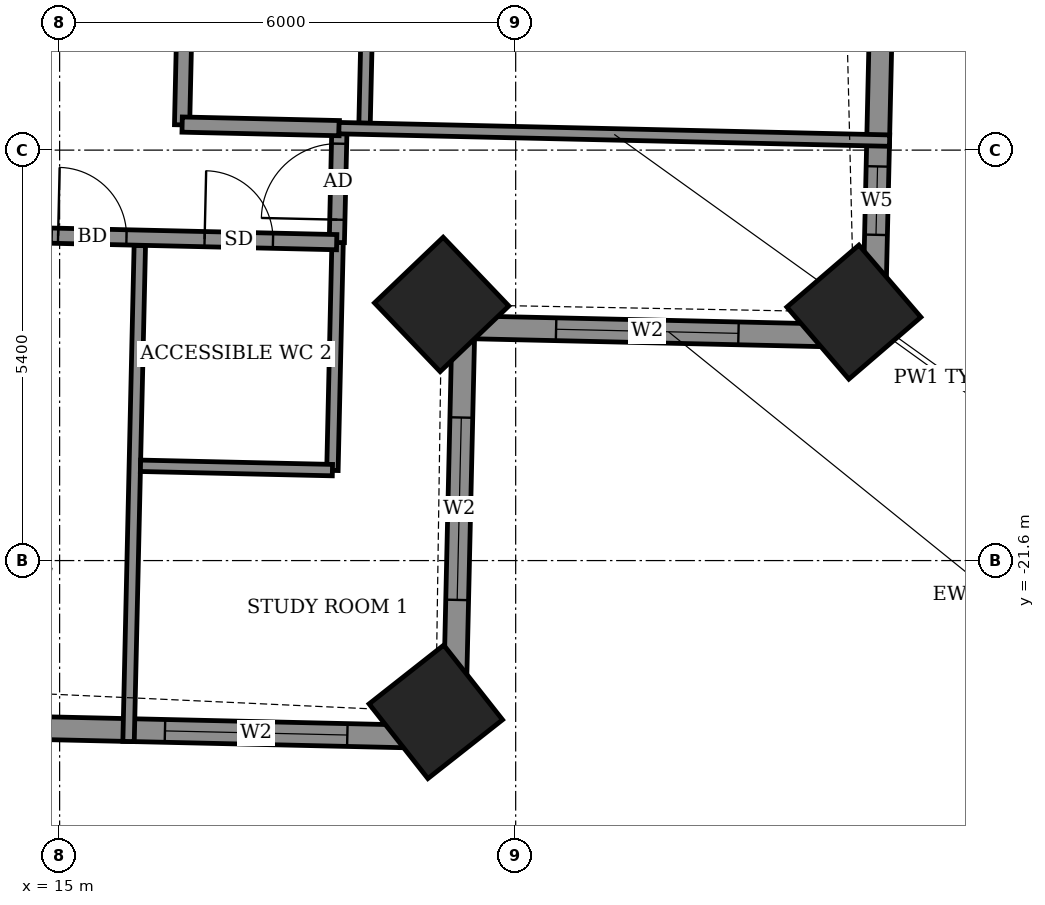
"""IFC4 building model, lengths in metres.
Left out: names, types, materials, properties, quantities, classifications, styles, units other than length and angle.
Written with IfcOpenShell. Run it as: python <this file> out.ifc"""

import sys

from ifc_helpers import new_model, si_unit, direction, frame, frame_2d, origin, origin_2d, place, context, subcontext, project, spatial, rectangle, extrude, element, fill, save


model = new_model("IFC4")
c1 = context("Model", 3, precision=1e-05, world=origin(), true_north=direction((0.0, 1.0)))
c2 = subcontext(c1, "Body", "Model", "MODEL_VIEW")
j1 = project(units=[si_unit("LENGTHUNIT", "METRE"), si_unit("PLANEANGLEUNIT", "RADIAN")], contexts=[c1])
p1 = place(None, origin())
s1 = spatial("IfcSite", under=j1, at=p1, CompositionType="ELEMENT")
p2 = place(p1, origin())
s2 = spatial("IfcBuilding", under=s1, at=p2, CompositionType="ELEMENT")
p3 = place(p2, frame((0.0, 0.0, 152.7)))
s3 = spatial("IfcBuildingStorey", under=s2, at=p3, CompositionType="ELEMENT", Elevation=152.7)
for number, where, z_axis, x_axis in (
    (1, (19.949, -23.59, -0.55), (0.0, 0.0, 1.0), (0.786, 0.619, 0.0)),
    (2, (20.026, -18.23, -0.55), (0.0, 0.0, 1.0), (0.723, 0.691, 0.0)),
    (3, (25.449, -18.331, -0.55), (0.0, 0.0, 1.0), (0.758, 0.652, 0.0)),
):
    element("IfcColumn", number, at=place(p3, frame(where, z_axis=z_axis, x_axis=x_axis)), inside=s3, PredefinedType="COLUMN", context=c2, shape_type="SweptSolid", body=[
        extrude(rectangle(XDim=1.25, YDim=1.25, at=origin_2d()), origin(), (0.0, 0.0, 1.0), 3.6),
    ])
p4 = place(p3, frame((25.71, -18.651, 0.0), z_axis=(0.0, 0.0, 1.0), x_axis=(0.02274444447, 0.999741311663, 0.0)))
e4 = element("IfcWall", 4, at=p4, inside=s3, PredefinedType="SOLIDWALL", context=c2, shape_type="SweptSolid", body=[
    extrude(rectangle(XDim=9.628, YDim=0.3, at=frame_2d((4.814, 0.0))), origin(), (0.0, 0.0, 1.0), 2.55),
])
p5 = place(p4, frame((1.337, 0.0, 0.9)))
e5 = element("IfcOpeningElement", 5, at=p5, cuts=e4, PredefinedType="OPENING", context=c2, shape_type="SweptSolid", body=[
    extrude(rectangle(XDim=0.9, YDim=1.5, at=frame_2d((0.45, 0.75))), frame((0.0, 0.16, 0.0), z_axis=(0.0, -1.0, 0.0), x_axis=(1.0, 0.0, 0.0)), (0.0, 0.0, 1.0), 0.32),
])
p6 = place(p4, frame((5.506, 0.0, 0.0)))
e6 = element("IfcOpeningElement", 6, at=p6, cuts=e4, PredefinedType="OPENING", context=c2, shape_type="SweptSolid", body=[
    extrude(rectangle(XDim=1.2, YDim=2.4, at=frame_2d((0.6, 1.2))), frame((0.0, 0.16, 0.0), z_axis=(0.0, -1.0, 0.0), x_axis=(1.0, 0.0, 0.0)), (0.0, 0.0, 1.0), 0.32),
])
p7 = place(p4, frame((7.537, 0.0, 0.9)))
e7 = element("IfcOpeningElement", 7, at=p7, cuts=e4, PredefinedType="OPENING", context=c2, shape_type="SweptSolid", body=[
    extrude(rectangle(XDim=1.2, YDim=1.5, at=frame_2d((0.6, 0.75))), frame((0.0, 0.16, 0.0), z_axis=(0.0, -1.0, 0.0), x_axis=(1.0, 0.0, 0.0)), (0.0, 0.0, 1.0), 0.32),
])
p8 = place(p3, frame((-18.781, -23.043, 0.0), z_axis=(0.0, 0.0, 1.0), x_axis=(0.999742794992, -0.022679150367, 0.0)))
e8 = element("IfcWall", 8, at=p8, inside=s3, PredefinedType="SOLIDWALL", context=c2, shape_type="SweptSolid", body=[
    extrude(rectangle(XDim=38.98, YDim=0.3, at=frame_2d((19.49, 0.0))), origin(), (0.0, 0.0, 1.0), 3.05),
])
p9 = place(p8, frame((1.94, 0.0, 0.0)))
e9 = element("IfcOpeningElement", 9, at=p9, cuts=e8, PredefinedType="OPENING", context=c2, shape_type="SweptSolid", body=[
    extrude(rectangle(XDim=1.5, YDim=2.4, at=frame_2d((0.75, 1.2))), frame((0.0, 0.16, 0.0), z_axis=(0.0, -1.0, 0.0), x_axis=(1.0, 0.0, 0.0)), (0.0, 0.0, 1.0), 0.32),
])
p10 = place(p8, frame((7.211, 0.0, 0.0)))
e10 = element("IfcOpeningElement", 10, at=p10, cuts=e8, PredefinedType="OPENING", context=c2, shape_type="SweptSolid", body=[
    extrude(rectangle(XDim=1.2, YDim=2.4, at=frame_2d((0.6, 1.2))), frame((0.0, 0.16, 0.0), z_axis=(0.0, -1.0, 0.0), x_axis=(1.0, 0.0, 0.0)), (0.0, 0.0, 1.0), 0.32),
])
p11 = place(p8, frame((9.959, 0.0, 0.0)))
e11 = element("IfcOpeningElement", 11, at=p11, cuts=e8, PredefinedType="OPENING", context=c2, shape_type="SweptSolid", body=[
    extrude(rectangle(XDim=1.5, YDim=2.4, at=frame_2d((0.75, 1.2))), frame((0.0, 0.16, 0.0), z_axis=(0.0, -1.0, 0.0), x_axis=(1.0, 0.0, 0.0)), (0.0, 0.0, 1.0), 0.32),
])
p12 = place(p8, frame((14.659, 0.0, 0.0)))
e12 = element("IfcOpeningElement", 12, at=p12, cuts=e8, PredefinedType="OPENING", context=c2, shape_type="SweptSolid", body=[
    extrude(rectangle(XDim=1.5, YDim=2.4, at=frame_2d((0.75, 1.2))), frame((0.0, 0.16, 0.0), z_axis=(0.0, -1.0, 0.0), x_axis=(1.0, 0.0, 0.0)), (0.0, 0.0, 1.0), 0.32),
])
p13 = place(p8, frame((20.232, 0.0, 0.0)))
e13 = element("IfcOpeningElement", 13, at=p13, cuts=e8, PredefinedType="OPENING", context=c2, shape_type="SweptSolid", body=[
    extrude(rectangle(XDim=1.2, YDim=2.4, at=frame_2d((0.6, 1.2))), frame((0.0, 0.16, 0.0), z_axis=(0.0, -1.0, 0.0), x_axis=(1.0, 0.0, 0.0)), (0.0, 0.0, 1.0), 0.32),
])
p14 = place(p8, frame((22.981, 0.0, 0.0)))
e14 = element("IfcOpeningElement", 14, at=p14, cuts=e8, PredefinedType="OPENING", context=c2, shape_type="SweptSolid", body=[
    extrude(rectangle(XDim=1.5, YDim=2.4, at=frame_2d((0.75, 1.2))), frame((0.0, 0.16, 0.0), z_axis=(0.0, -1.0, 0.0), x_axis=(1.0, 0.0, 0.0)), (0.0, 0.0, 1.0), 0.32),
])
p15 = place(p8, frame((27.681, 0.0, 0.0)))
e15 = element("IfcOpeningElement", 15, at=p15, cuts=e8, PredefinedType="OPENING", context=c2, shape_type="SweptSolid", body=[
    extrude(rectangle(XDim=1.5, YDim=2.4, at=frame_2d((0.75, 1.2))), frame((0.0, 0.16, 0.0), z_axis=(0.0, -1.0, 0.0), x_axis=(1.0, 0.0, 0.0)), (0.0, 0.0, 1.0), 0.32),
])
p16 = place(p8, frame((30.654, 0.0, 0.0)))
e16 = element("IfcOpeningElement", 16, at=p16, cuts=e8, PredefinedType="OPENING", context=c2, shape_type="SweptSolid", body=[
    extrude(rectangle(XDim=1.2, YDim=2.4, at=frame_2d((0.6, 1.2))), frame((0.0, 0.16, 0.0), z_axis=(0.0, -1.0, 0.0), x_axis=(1.0, 0.0, 0.0)), (0.0, 0.0, 1.0), 0.32),
])
p17 = place(p8, frame((35.176, 0.0, 0.9)))
e17 = element("IfcOpeningElement", 17, at=p17, cuts=e8, PredefinedType="OPENING", context=c2, shape_type="SweptSolid", body=[
    extrude(rectangle(XDim=2.4, YDim=1.5, at=frame_2d((1.2, 0.75))), frame((0.0, 0.16, 0.0), z_axis=(0.0, -1.0, 0.0), x_axis=(1.0, 0.0, 0.0)), (0.0, 0.0, 1.0), 0.32),
])
p18 = place(p3, frame((20.189, -23.927, 0.0), z_axis=(0.0, 0.0, 1.0), x_axis=(0.022789195272, 0.999740292565, 0.0)))
e18 = element("IfcWall", 18, at=p18, inside=s3, PredefinedType="SOLIDWALL", context=c2, shape_type="SweptSolid", body=[
    extrude(rectangle(XDim=5.399, YDim=0.3, at=frame_2d((2.7, 0.0))), origin(), (0.0, 0.0, 1.0), 2.55),
])
p19 = place(p18, frame((1.81, 0.0, 0.9)))
e19 = element("IfcOpeningElement", 19, at=p19, cuts=e18, PredefinedType="OPENING", context=c2, shape_type="SweptSolid", body=[
    extrude(rectangle(XDim=2.4, YDim=1.5, at=frame_2d((1.2, 0.75))), frame((0.0, 0.16, 0.0), z_axis=(0.0, -1.0, 0.0), x_axis=(1.0, 0.0, 0.0)), (0.0, 0.0, 1.0), 0.32),
])
p20 = place(p3, frame((20.312, -18.529, 0.0), z_axis=(0.0, 0.0, 1.0), x_axis=(0.999745417973, -0.02256322766, 0.0)))
e20 = element("IfcWall", 20, at=p20, inside=s3, PredefinedType="SOLIDWALL", context=c2, shape_type="SweptSolid", body=[
    extrude(rectangle(XDim=5.399, YDim=0.3, at=frame_2d((2.7, 0.0))), origin(), (0.0, 0.0, 1.0), 2.55),
])
p21 = place(p20, frame((1.22, 0.0, 0.9)))
e21 = element("IfcOpeningElement", 21, at=p21, cuts=e20, PredefinedType="OPENING", context=c2, shape_type="SweptSolid", body=[
    extrude(rectangle(XDim=2.4, YDim=1.5, at=frame_2d((1.2, 0.75))), frame((0.0, 0.16, 0.0), z_axis=(0.0, -1.0, 0.0), x_axis=(1.0, 0.0, 0.0)), (0.0, 0.0, 1.0), 0.32),
])
p22 = place(p3, frame((15.907, -23.98, 0.0), z_axis=(0.0, 0.0, 1.0), x_axis=(0.022672114006, 0.999742954587, 0.0)))
e22 = element("IfcWall", 22, at=p22, inside=s3, PredefinedType="PARTITIONING", context=c2, shape_type="SweptSolid", body=[
    extrude(rectangle(XDim=6.526, YDim=0.15, at=frame_2d((3.263, 0.0))), origin(), (0.0, 0.0, 1.0), 2.55),
])
p23 = place(p3, frame((18.589, -20.414, 0.0), z_axis=(0.0, 0.0, 1.0), x_axis=(0.022625271604, 0.999744015778, 0.0)))
e23 = element("IfcWall", 23, at=p23, inside=s3, PredefinedType="PARTITIONING", context=c2, shape_type="SweptSolid", body=[
    extrude(rectangle(XDim=3.0, YDim=0.15, at=frame_2d((1.5, 0.0))), origin(), (0.0, 0.0, 1.0), 3.05),
])
p24 = place(p3, frame((16.064, -20.353, 0.0), z_axis=(0.0, 0.0, 1.0), x_axis=(0.999746356616, -0.022521599255, 0.0)))
e24 = element("IfcWall", 24, at=p24, inside=s3, PredefinedType="PARTITIONING", context=c2, shape_type="SweptSolid", body=[
    extrude(rectangle(XDim=2.526, YDim=0.15, at=frame_2d((1.263, 0.0))), origin(), (0.0, 0.0, 1.0), 3.05),
])
p25 = place(p3, frame((18.647, -17.415, 0.0), z_axis=(0.0, 0.0, 1.0), x_axis=(0.022617910375, 0.999744182344, 0.0)))
e25 = element("IfcWall", 25, at=p25, inside=s3, PredefinedType="PARTITIONING", context=c2, shape_type="SweptSolid", body=[
    extrude(rectangle(XDim=1.5, YDim=0.2, at=frame_2d((0.75, 0.0))), origin(), (0.0, 0.0, 1.0), 3.05),
])
p26 = place(p25, frame((0.3, 0.0, 0.0)))
e26 = element("IfcOpeningElement", 26, at=p26, cuts=e25, PredefinedType="OPENING", context=c2, shape_type="SweptSolid", body=[
    extrude(rectangle(XDim=1.0, YDim=2.1, at=frame_2d((0.5, 1.05))), frame((0.0, 0.11, 0.0), z_axis=(0.0, -1.0, 0.0), x_axis=(1.0, 0.0, 0.0)), (0.0, 0.0, 1.0), 0.22),
])
p27 = place(p3, frame((14.88, -17.325, 0.0), z_axis=(0.0, 0.0, 1.0), x_axis=(0.999739622, -0.022818593369, 0.0)))
e27 = element("IfcWall", 27, at=p27, inside=s3, PredefinedType="PARTITIONING", context=c2, shape_type="SweptSolid", body=[
    extrude(rectangle(XDim=3.766, YDim=0.2, at=frame_2d((1.883, 0.0))), origin(), (0.0, 0.0, 1.0), 3.05),
])
p28 = place(p27, frame((0.1, 0.0, 0.0)))
e28 = element("IfcOpeningElement", 28, at=p28, cuts=e27, PredefinedType="OPENING", context=c2, shape_type="SweptSolid", body=[
    extrude(rectangle(XDim=0.9, YDim=2.1, at=frame_2d((0.45, 1.05))), frame((0.0, 0.11, 0.0), z_axis=(0.0, -1.0, 0.0), x_axis=(1.0, 0.0, 0.0)), (0.0, 0.0, 1.0), 0.22),
])
p29 = place(p27, frame((2.028, 0.0, 0.0)))
e29 = element("IfcOpeningElement", 29, at=p29, cuts=e27, PredefinedType="OPENING", context=c2, shape_type="SweptSolid", body=[
    extrude(rectangle(XDim=0.9, YDim=2.1, at=frame_2d((0.45, 1.05))), frame((0.0, 0.11, 0.0), z_axis=(0.0, -1.0, 0.0), x_axis=(1.0, 0.0, 0.0)), (0.0, 0.0, 1.0), 0.22),
])
p30 = place(p3, frame((16.611, -15.868, 0.0), z_axis=(0.0, 0.0, 1.0), x_axis=(0.022698399288, 0.999742358145, 0.0)))
e30 = element("IfcWall", 30, at=p30, inside=s3, PredefinedType="PARTITIONING", context=c2, shape_type="SweptSolid", body=[
    extrude(rectangle(XDim=8.196, YDim=0.2, at=frame_2d((4.098, 0.0))), origin(), (0.0, 0.0, 1.0), 3.05),
])
p31 = place(p30, frame((3.025, 0.0, 0.0)))
e31 = element("IfcOpeningElement", 31, at=p31, cuts=e30, PredefinedType="OPENING", context=c2, shape_type="SweptSolid", body=[
    extrude(rectangle(XDim=0.9, YDim=2.1, at=frame_2d((0.45, 1.05))), frame((0.0, 0.11, 0.0), z_axis=(0.0, -1.0, 0.0), x_axis=(1.0, 0.0, 0.0)), (0.0, 0.0, 1.0), 0.22),
])
p32 = place(p30, frame((5.786, 0.0, 0.0)))
e32 = element("IfcOpeningElement", 32, at=p32, cuts=e30, PredefinedType="OPENING", context=c2, shape_type="SweptSolid", body=[
    extrude(rectangle(XDim=1.0, YDim=2.1, at=frame_2d((0.5, 1.05))), frame((0.0, 0.11, 0.0), z_axis=(0.0, -1.0, 0.0), x_axis=(1.0, 0.0, 0.0)), (0.0, 0.0, 1.0), 0.22),
])
p33 = place(p3, frame((19.012, -15.848, 0.0), z_axis=(0.0, 0.0, 1.0), x_axis=(0.022781023197, 0.999740478815, 0.0)))
e33 = element("IfcWall", 33, at=p33, inside=s3, PredefinedType="PARTITIONING", context=c2, shape_type="SweptSolid", body=[
    extrude(rectangle(XDim=2.325, YDim=0.15, at=frame_2d((1.163, 0.0))), origin(), (0.0, 0.0, 1.0), 3.05),
])
p34 = place(p3, frame((16.612, -15.864, 0.0), z_axis=(0.0, 0.0, 1.0), x_axis=(0.999742931749, -0.02267312106, 0.0)))
e34 = element("IfcWall", 34, at=p34, inside=s3, PredefinedType="PARTITIONING", context=c2, shape_type="SweptSolid", body=[
    extrude(rectangle(XDim=2.067, YDim=0.2, at=frame_2d((1.034, 0.0))), origin(), (0.0, 0.0, 1.0), 3.05),
])
p35 = place(p3, frame((18.675, -15.911, 0.0), z_axis=(0.0, 0.0, 1.0), x_axis=(0.999743624132, -0.022642570706, 0.0)))
e35 = element("IfcWall", 35, at=p35, inside=s3, PredefinedType="PARTITIONING", context=c2, shape_type="SweptSolid", body=[
    extrude(rectangle(XDim=7.246, YDim=0.15, at=frame_2d((3.623, 0.0))), origin(), (0.0, 0.0, 1.0), 2.55),
])
p36 = place(p5, origin())
e36 = element("IfcWindow", 36, at=p36, inside=s3, PartitioningType="SINGLE_PANEL", PredefinedType="WINDOW", context=c2, shape_type="SweptSolid", body=[
    extrude(rectangle(XDim=0.9, YDim=1.5, at=frame_2d((0.45, 0.75))), frame((0.0, 0.03, 0.0), z_axis=(0.0, -1.0, 0.0), x_axis=(1.0, 0.0, 0.0)), (0.0, 0.0, 1.0), 0.06),
])
fill(e5, e36)
p37 = place(p17, origin())
e37 = element("IfcWindow", 37, at=p37, inside=s3, PartitioningType="DOUBLE_PANEL_VERTICAL", PredefinedType="WINDOW", context=c2, shape_type="SweptSolid", body=[
    extrude(rectangle(XDim=2.4, YDim=1.5, at=frame_2d((1.2, 0.75))), frame((0.0, 0.03, 0.0), z_axis=(0.0, -1.0, 0.0), x_axis=(1.0, 0.0, 0.0)), (0.0, 0.0, 1.0), 0.06),
])
fill(e17, e37)
p38 = place(p19, origin())
e38 = element("IfcWindow", 38, at=p38, inside=s3, PartitioningType="DOUBLE_PANEL_VERTICAL", PredefinedType="WINDOW", context=c2, shape_type="SweptSolid", body=[
    extrude(rectangle(XDim=2.4, YDim=1.5, at=frame_2d((1.2, 0.75))), frame((0.0, 0.03, 0.0), z_axis=(0.0, -1.0, 0.0), x_axis=(1.0, 0.0, 0.0)), (0.0, 0.0, 1.0), 0.06),
])
fill(e19, e38)
p39 = place(p21, origin())
e39 = element("IfcWindow", 39, at=p39, inside=s3, PartitioningType="DOUBLE_PANEL_VERTICAL", PredefinedType="WINDOW", context=c2, shape_type="SweptSolid", body=[
    extrude(rectangle(XDim=2.4, YDim=1.5, at=frame_2d((1.2, 0.75))), frame((0.0, 0.03, 0.0), z_axis=(0.0, -1.0, 0.0), x_axis=(1.0, 0.0, 0.0)), (0.0, 0.0, 1.0), 0.06),
])
fill(e21, e39)
p40 = place(p28, origin())
e40 = element("IfcDoor", 40, at=p40, inside=s3, OperationType="SINGLE_SWING_LEFT", PredefinedType="DOOR", context=c2, shape_type="SweptSolid", body=[
    extrude(rectangle(XDim=0.9, YDim=2.1, at=frame_2d((0.45, 1.05))), frame((0.0, 0.025, 0.0), z_axis=(0.0, -1.0, 0.0), x_axis=(1.0, 0.0, 0.0)), (0.0, 0.0, 1.0), 0.05),
])
fill(e28, e40)
p41 = place(p26, origin())
e41 = element("IfcDoor", 41, at=p41, inside=s3, OperationType="SINGLE_SWING_RIGHT", PredefinedType="DOOR", context=c2, shape_type="SweptSolid", body=[
    extrude(rectangle(XDim=1.0, YDim=2.1, at=frame_2d((0.5, 1.05))), frame((0.0, 0.025, 0.0), z_axis=(0.0, -1.0, 0.0), x_axis=(1.0, 0.0, 0.0)), (0.0, 0.0, 1.0), 0.05),
])
fill(e26, e41)
p42 = place(p29, origin())
e42 = element("IfcDoor", 42, at=p42, inside=s3, OperationType="SINGLE_SWING_RIGHT", PredefinedType="DOOR", context=c2, shape_type="SweptSolid", body=[
    extrude(rectangle(XDim=0.9, YDim=2.1, at=frame_2d((0.45, 1.05))), frame((0.0, 0.025, 0.0), z_axis=(0.0, -1.0, 0.0), x_axis=(1.0, 0.0, 0.0)), (0.0, 0.0, 1.0), 0.05),
])
fill(e29, e42)
save(model, sys.argv[1])
